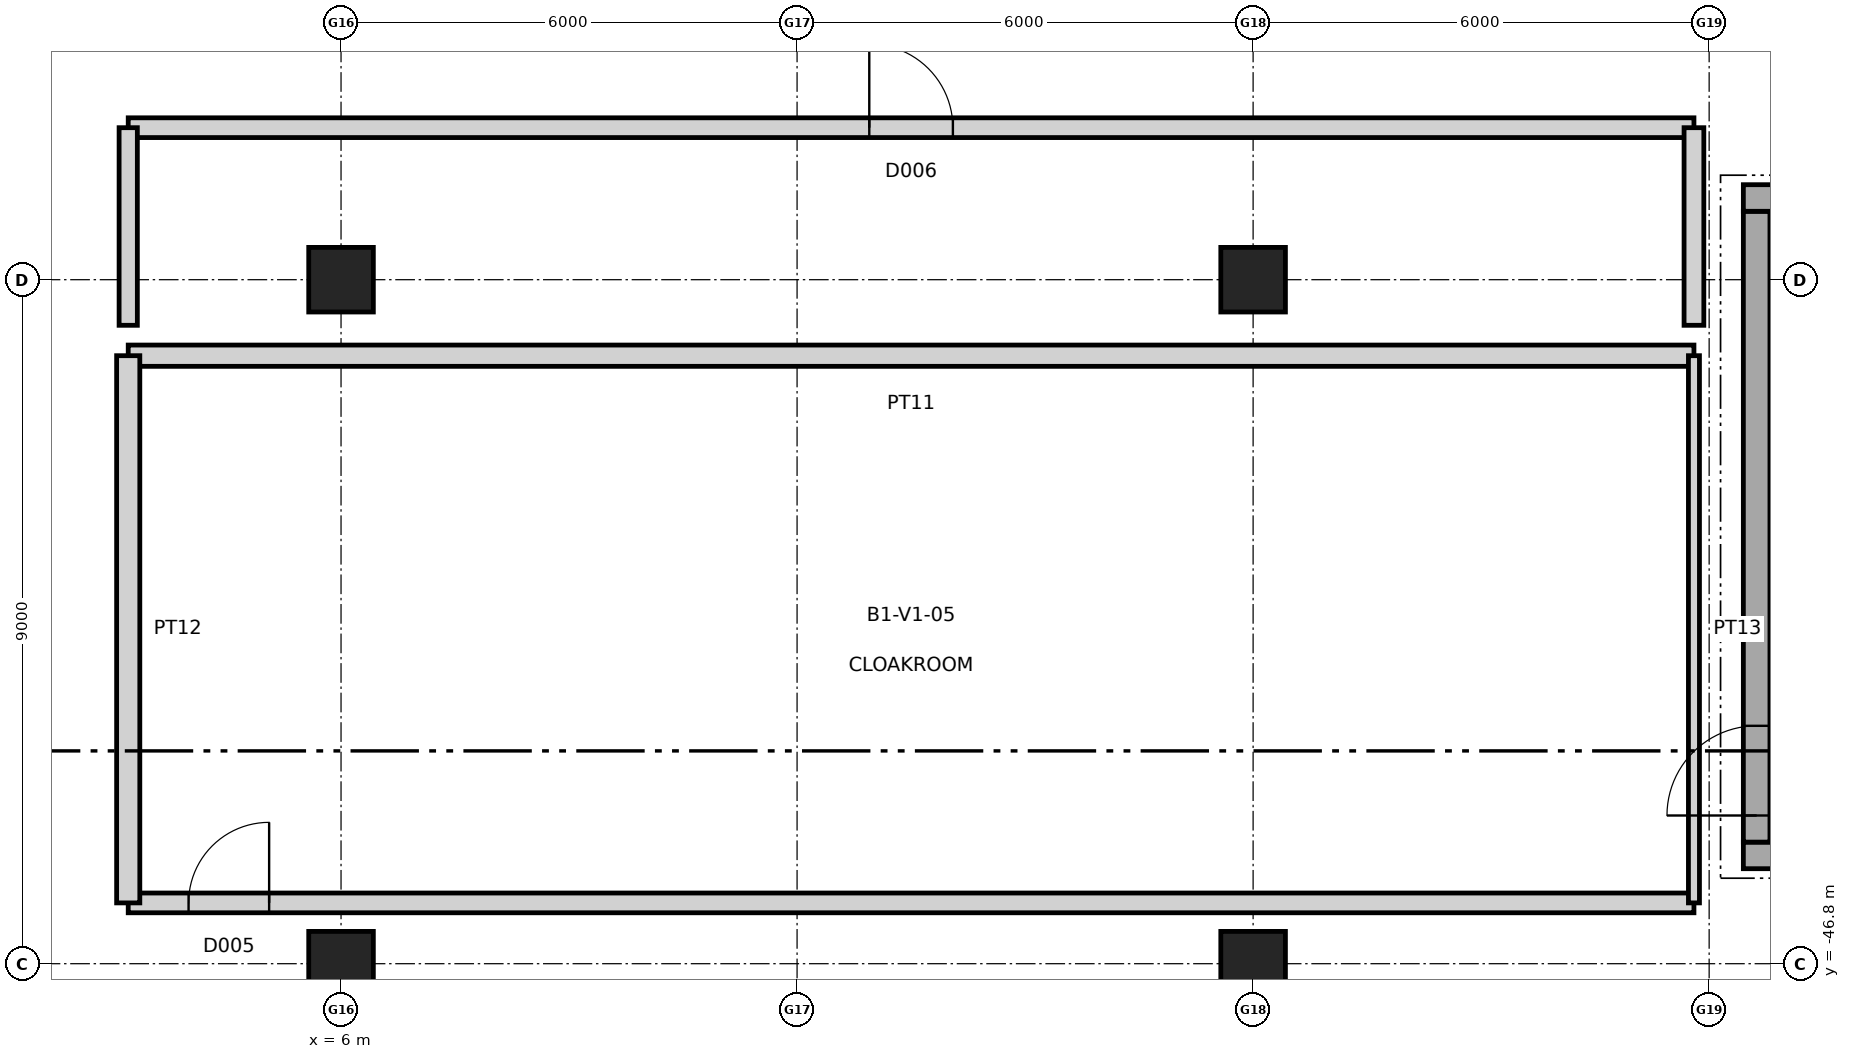
"""IFC4 building model, lengths in metres.
Left out: names, types, materials, properties, quantities, classifications, styles, units other than length and angle.
Written with IfcOpenShell. Run it as: python <this file> out.ifc"""

import sys

from ifc_helpers import new_model, si_unit, direction, frame, frame_2d, origin, origin_2d, place, context, subcontext, project, spatial, rectangle, circle, extrude, element, fill, save


model = new_model("IFC4")
c1 = context("Model", 3, precision=1e-05, world=origin(), true_north=direction((0.0, 1.0)))
c2 = subcontext(c1, "Body", "Model", "MODEL_VIEW")
j1 = project(units=[si_unit("LENGTHUNIT", "METRE"), si_unit("PLANEANGLEUNIT", "RADIAN")], contexts=[c1])
p1 = place(None, origin())
s1 = spatial("IfcSite", under=j1, at=p1, CompositionType="ELEMENT")
p2 = place(p1, origin())
s2 = spatial("IfcBuilding", under=s1, at=p2, CompositionType="ELEMENT")
p3 = place(p2, frame((0.0, 0.0, -5.4)))
s3 = spatial("IfcBuildingStorey", under=s2, at=p3, CompositionType="ELEMENT", Elevation=-5.4)
for number, where, z_axis, x_axis in (
    (1, (6.0, -46.8, 0.0), (0.0, 0.0, 1.0), (1.0, 0.0, 0.0)),
    (2, (6.0, -37.8, 0.0), (0.0, 0.0, 1.0), (1.0, 0.0, 0.0)),
    (3, (18.0, -46.8, 0.0), (0.0, 0.0, 1.0), (1.0, 0.0, 0.0)),
    (4, (18.0, -37.8, 0.0), (0.0, 0.0, 1.0), (1.0, 0.0, 0.0)),
):
    element("IfcColumn", number, at=place(p3, frame(where, z_axis=z_axis, x_axis=x_axis)), inside=s3, PredefinedType="COLUMN", context=c2, shape_type="SweptSolid", body=[
        extrude(circle(Radius=0.425, at=origin_2d()), origin(), (0.0, 0.0, 1.0), 5.4),
    ])
p4 = place(p3, frame((29.05, -45.375, 0.0), z_axis=(0.0, 0.0, 1.0), x_axis=(-1.0, 0.0, 0.0)))
e5 = element("IfcWall", 5, at=p4, inside=s3, PredefinedType="SHEAR", context=c2, shape_type="SweptSolid", body=[
    extrude(rectangle(XDim=4.6, YDim=0.35, at=frame_2d((2.3, 0.0))), origin(), (0.0, 0.0, 1.0), 5.4),
])
p5 = place(p3, frame((24.625, -45.2, 0.0), z_axis=(0.0, 0.0, 1.0), x_axis=(0.0, 1.0, 0.0)))
e6 = element("IfcWall", 6, at=p5, inside=s3, PredefinedType="SHEAR", context=c2, shape_type="SweptSolid", body=[
    extrude(rectangle(XDim=8.3, YDim=0.35, at=frame_2d((4.15, 0.0))), origin(), (0.0, 0.0, 1.0), 5.4),
])
p6 = place(p5, frame((0.35, 0.0, 0.0)))
e7 = element("IfcOpeningElement", 7, at=p6, cuts=e6, PredefinedType="OPENING", context=c2, shape_type="SweptSolid", body=[
    extrude(rectangle(XDim=1.18, YDim=2.15, at=frame_2d((0.59, 1.075))), frame((0.0, 0.185, 0.0), z_axis=(0.0, -1.0, 0.0), x_axis=(1.0, 0.0, 0.0)), (0.0, 0.0, 1.0), 0.37),
])
p7 = place(p3, frame((24.45, -36.725, 0.0), z_axis=(0.0, 0.0, 1.0), x_axis=(1.0, 0.0, 0.0)))
e8 = element("IfcWall", 8, at=p7, inside=s3, PredefinedType="SHEAR", context=c2, shape_type="SweptSolid", body=[
    extrude(rectangle(XDim=4.6, YDim=0.35, at=frame_2d((2.3, 0.0))), origin(), (0.0, 0.0, 1.0), 5.4),
])
p8 = place(p3, frame((3.2, -46.0, 0.0), z_axis=(0.0, 0.0, 1.0), x_axis=(1.0, 0.0, 0.0)))
e9 = element("IfcWall", 9, at=p8, inside=s3, PredefinedType="PARTITIONING", context=c2, shape_type="SweptSolid", body=[
    extrude(rectangle(XDim=20.6, YDim=0.26, at=frame_2d((10.3, 0.0))), origin(), (0.0, 0.0, 1.0), 5.02),
])
p9 = place(p8, frame((0.794, 0.0, 0.0)))
e10 = element("IfcOpeningElement", 10, at=p9, cuts=e9, PredefinedType="OPENING", context=c2, shape_type="SweptSolid", body=[
    extrude(rectangle(XDim=1.06, YDim=2.15, at=frame_2d((0.53, 1.075))), frame((0.0, 0.14, 0.0), z_axis=(0.0, -1.0, 0.0), x_axis=(1.0, 0.0, 0.0)), (0.0, 0.0, 1.0), 0.28),
])
p10 = place(p3, frame((3.2, -38.8, 0.0), z_axis=(0.0, 0.0, 1.0), x_axis=(1.0, 0.0, 0.0)))
e11 = element("IfcWall", 11, at=p10, inside=s3, PredefinedType="PARTITIONING", context=c2, shape_type="SweptSolid", body=[
    extrude(rectangle(XDim=20.6, YDim=0.28, at=frame_2d((10.3, 0.0))), origin(), (0.0, 0.0, 1.0), 5.02),
])
p11 = place(p3, frame((3.2, -46.0, 0.0), z_axis=(0.0, 0.0, 1.0), x_axis=(0.0, 1.0, 0.0)))
e12 = element("IfcWall", 12, at=p11, inside=s3, PredefinedType="PARTITIONING", context=c2, shape_type="SweptSolid", body=[
    extrude(rectangle(XDim=7.2, YDim=0.305, at=frame_2d((3.6, 0.0))), origin(), (0.0, 0.0, 1.0), 5.02),
])
p12 = place(p3, frame((23.8, -46.0, 0.0), z_axis=(0.0, 0.0, 1.0), x_axis=(0.0, 1.0, 0.0)))
e13 = element("IfcWall", 13, at=p12, inside=s3, PredefinedType="PARTITIONING", context=c2, shape_type="SweptSolid", body=[
    extrude(rectangle(XDim=7.2, YDim=0.145, at=frame_2d((3.6, 0.0))), origin(), (0.0, 0.0, 1.0), 5.02),
])
p13 = place(p3, frame((3.2, -35.8, 0.0), z_axis=(0.0, 0.0, 1.0), x_axis=(1.0, 0.0, 0.0)))
e14 = element("IfcWall", 14, at=p13, inside=s3, PredefinedType="PARTITIONING", context=c2, shape_type="SweptSolid", body=[
    extrude(rectangle(XDim=20.6, YDim=0.26, at=frame_2d((10.3, 0.0))), origin(), (0.0, 0.0, 1.0), 5.02),
])
p14 = place(p13, frame((9.75, 0.0, 0.0)))
e15 = element("IfcOpeningElement", 15, at=p14, cuts=e14, PredefinedType="OPENING", context=c2, shape_type="SweptSolid", body=[
    extrude(rectangle(XDim=1.1, YDim=2.2, at=frame_2d((0.55, 1.1))), frame((0.0, 0.14, 0.0), z_axis=(0.0, -1.0, 0.0), x_axis=(1.0, 0.0, 0.0)), (0.0, 0.0, 1.0), 0.28),
])
p15 = place(p3, frame((3.2, -38.4, 0.0), z_axis=(0.0, 0.0, 1.0), x_axis=(0.0, 1.0, 0.0)))
e16 = element("IfcWall", 16, at=p15, inside=s3, PredefinedType="PARTITIONING", context=c2, shape_type="SweptSolid", body=[
    extrude(rectangle(XDim=2.6, YDim=0.24, at=frame_2d((1.3, 0.0))), origin(), (0.0, 0.0, 1.0), 5.02),
])
p16 = place(p3, frame((23.8, -38.4, 0.0), z_axis=(0.0, 0.0, 1.0), x_axis=(0.0, 1.0, 0.0)))
e17 = element("IfcWall", 17, at=p16, inside=s3, PredefinedType="PARTITIONING", context=c2, shape_type="SweptSolid", body=[
    extrude(rectangle(XDim=2.6, YDim=0.26, at=frame_2d((1.3, 0.0))), origin(), (0.0, 0.0, 1.0), 5.02),
])
p17 = place(p6, origin())
e18 = element("IfcDoor", 18, at=p17, inside=s3, OperationType="SINGLE_SWING_LEFT", PredefinedType="DOOR", context=c2, shape_type="SweptSolid", body=[
    extrude(rectangle(XDim=1.18, YDim=2.15, at=frame_2d((0.59, 1.075))), frame((0.0, 0.025, 0.0), z_axis=(0.0, -1.0, 0.0), x_axis=(1.0, 0.0, 0.0)), (0.0, 0.0, 1.0), 0.05),
])
fill(e7, e18)
p18 = place(p9, origin())
e19 = element("IfcDoor", 19, at=p18, inside=s3, OperationType="SINGLE_SWING_RIGHT", PredefinedType="DOOR", context=c2, shape_type="SweptSolid", body=[
    extrude(rectangle(XDim=1.06, YDim=2.15, at=frame_2d((0.53, 1.075))), frame((0.0, 0.025, 0.0), z_axis=(0.0, -1.0, 0.0), x_axis=(1.0, 0.0, 0.0)), (0.0, 0.0, 1.0), 0.05),
])
fill(e10, e19)
p19 = place(p14, origin())
e20 = element("IfcDoor", 20, at=p19, inside=s3, OperationType="SINGLE_SWING_LEFT", PredefinedType="DOOR", context=c2, shape_type="SweptSolid", body=[
    extrude(rectangle(XDim=1.1, YDim=2.2, at=frame_2d((0.55, 1.1))), frame((0.0, 0.025, 0.0), z_axis=(0.0, -1.0, 0.0), x_axis=(1.0, 0.0, 0.0)), (0.0, 0.0, 1.0), 0.05),
])
fill(e15, e20)
save(model, sys.argv[1])
